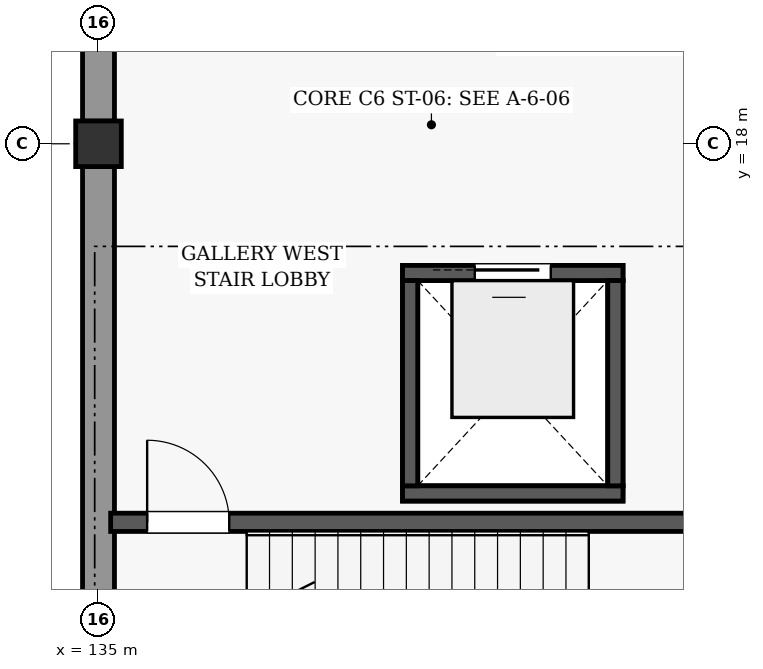
"""IFC4 building model, lengths in metres.
Left out: names, types, materials, properties, quantities, classifications, styles, units other than length and angle.
Written with IfcOpenShell. Run it as: python <this file> out.ifc"""

import sys

from ifc_helpers import new_model, si_unit, direction, frame, frame_2d, origin, origin_2d, place, context, subcontext, project, spatial, rectangle, extrude, element, fill, save


model = new_model("IFC4")
c1 = context("Model", 3, precision=1e-05, world=origin(), true_north=direction((0.0, 1.0)))
c2 = subcontext(c1, "Body", "Model", "MODEL_VIEW")
j1 = project(units=[si_unit("LENGTHUNIT", "METRE"), si_unit("PLANEANGLEUNIT", "RADIAN")], contexts=[c1])
p1 = place(None, origin())
s1 = spatial("IfcSite", under=j1, at=p1, CompositionType="ELEMENT")
p2 = place(p1, origin())
s2 = spatial("IfcBuilding", under=s1, at=p2, CompositionType="ELEMENT")
p3 = place(p2, origin())
s3 = spatial("IfcBuildingStorey", under=s2, at=p3, CompositionType="ELEMENT", Elevation=0.0)
p4 = place(p3, frame((135.0, 18.0, 0.0), z_axis=(0.0, 0.0, 1.0), x_axis=(1.0, 0.0, 0.0)))
e1 = element("IfcColumn", 1, at=p4, inside=s3, PredefinedType="COLUMN", context=c2, shape_type="SweptSolid", body=[
    extrude(rectangle(XDim=0.6, YDim=0.6, at=origin_2d()), origin(), (0.0, 0.0, 1.0), 4.8),
])
p5 = place(p3, frame((135.0, 9.348, 0.0), z_axis=(0.0, 0.0, 1.0), x_axis=(0.0, 1.0, 0.0)))
e2 = element("IfcWall", 2, at=p5, inside=s3, PredefinedType="SOLIDWALL", context=c2, shape_type="SweptSolid", body=[
    extrude(rectangle(XDim=8.354, YDim=0.42, at=frame_2d((4.177, 0.0))), origin(), (0.0, 0.0, 1.0), 4.062),
])
p6 = place(p5, frame((1.362, 0.0, 0.0)))
e3 = element("IfcOpeningElement", 3, at=p6, cuts=e2, PredefinedType="OPENING", context=c2, shape_type="SweptSolid", body=[
    extrude(rectangle(XDim=1.12, YDim=2.14, at=frame_2d((0.56, 1.07))), frame((0.0, 0.22, 0.0), z_axis=(0.0, -1.0, 0.0), x_axis=(1.0, 0.0, 0.0)), (0.0, 0.0, 1.0), 0.44),
])
p7 = place(p3, frame((135.0, 18.298, 0.0), z_axis=(0.0, 0.0, 1.0), x_axis=(0.0, 1.0, 0.0)))
e4 = element("IfcWall", 4, at=p7, inside=s3, PredefinedType="SOLIDWALL", context=c2, shape_type="SweptSolid", body=[
    extrude(rectangle(XDim=8.404, YDim=0.42, at=frame_2d((4.202, 0.0))), origin(), (0.0, 0.0, 1.0), 4.062),
])
p8 = place(p7, frame((1.815, 0.0, 0.85)))
e5 = element("IfcOpeningElement", 5, at=p8, cuts=e4, PredefinedType="OPENING", context=c2, shape_type="SweptSolid", body=[
    extrude(rectangle(XDim=1.48, YDim=1.56, at=frame_2d((0.74, 0.78))), frame((0.0, 0.22, 0.0), z_axis=(0.0, -1.0, 0.0), x_axis=(1.0, 0.0, 0.0)), (0.0, 0.0, 1.0), 0.44),
])
p9 = place(p7, frame((5.109, 0.0, 0.85)))
e6 = element("IfcOpeningElement", 6, at=p9, cuts=e4, PredefinedType="OPENING", context=c2, shape_type="SweptSolid", body=[
    extrude(rectangle(XDim=1.48, YDim=1.56, at=frame_2d((0.74, 0.78))), frame((0.0, 0.22, 0.0), z_axis=(0.0, -1.0, 0.0), x_axis=(1.0, 0.0, 0.0)), (0.0, 0.0, 1.0), 0.44),
])
p10 = place(p3, frame((135.16, 13.02, 0.0), z_axis=(0.0, 0.0, 1.0), x_axis=(1.0, 0.0, 0.0)))
e7 = element("IfcWall", 7, at=p10, inside=s3, PredefinedType="SHEAR", context=c2, shape_type="SweptSolid", body=[
    extrude(rectangle(XDim=8.44, YDim=0.24, at=frame_2d((4.22, 0.0))), origin(), (0.0, 0.0, 1.0), 4.55),
])
p11 = place(p10, frame((0.48, 0.0, 0.0)))
e8 = element("IfcOpeningElement", 8, at=p11, cuts=e7, PredefinedType="OPENING", context=c2, shape_type="SweptSolid", body=[
    extrude(rectangle(XDim=1.08, YDim=2.08, at=frame_2d((0.54, 1.04))), frame((0.0, 0.13, 0.0), z_axis=(0.0, -1.0, 0.0), x_axis=(1.0, 0.0, 0.0)), (0.0, 0.0, 1.0), 0.26),
])
for number, where, z_axis, x_axis in (
    (9, (139.0, 13.4, -1.4), (0.0, 0.0, 1.0), (1.0, 0.0, 0.0)),
    (10, (139.0, 16.3, -1.4), (0.0, 0.0, 1.0), (1.0, 0.0, 0.0)),
):
    element("IfcWall", number, at=place(p3, frame(where, z_axis=z_axis, x_axis=x_axis)), inside=s3, PredefinedType="SHEAR", context=c2, shape_type="SweptSolid", body=[
        extrude(rectangle(XDim=2.9, YDim=0.2, at=frame_2d((1.45, 0.0))), origin(), (0.0, 0.0, 1.0), 1.1),
    ])
for number, where, z_axis, x_axis in (
    (11, (139.1, 13.5, -1.4), (0.0, 0.0, 1.0), (0.0, 1.0, 0.0)),
    (12, (141.8, 13.5, -1.4), (0.0, 0.0, 1.0), (0.0, 1.0, 0.0)),
):
    element("IfcWall", number, at=place(p3, frame(where, z_axis=z_axis, x_axis=x_axis)), inside=s3, PredefinedType="SHEAR", context=c2, shape_type="SweptSolid", body=[
        extrude(rectangle(XDim=2.7, YDim=0.2, at=frame_2d((1.35, 0.0))), origin(), (0.0, 0.0, 1.0), 1.1),
    ])
p12 = place(p3, frame((139.0, 13.4, 0.0), z_axis=(0.0, 0.0, 1.0), x_axis=(1.0, 0.0, 0.0)))
e13 = element("IfcWall", 13, at=p12, inside=s3, PredefinedType="SHEAR", context=c2, shape_type="SweptSolid", body=[
    extrude(rectangle(XDim=2.9, YDim=0.2, at=frame_2d((1.45, 0.0))), origin(), (0.0, 0.0, 1.0), 4.55),
])
p13 = place(p3, frame((139.0, 16.3, 0.0), z_axis=(0.0, 0.0, 1.0), x_axis=(1.0, 0.0, 0.0)))
e14 = element("IfcWall", 14, at=p13, inside=s3, PredefinedType="SHEAR", context=c2, shape_type="SweptSolid", body=[
    extrude(rectangle(XDim=2.9, YDim=0.2, at=frame_2d((1.45, 0.0))), origin(), (0.0, 0.0, 1.0), 4.55),
])
p14 = place(p13, frame((0.95, 0.0, 0.0)))
e15 = element("IfcOpeningElement", 15, at=p14, cuts=e14, PredefinedType="OPENING", context=c2, shape_type="SweptSolid", body=[
    extrude(rectangle(XDim=1.0, YDim=2.1, at=frame_2d((0.5, 1.05))), frame((0.0, 0.11, 0.0), z_axis=(0.0, -1.0, 0.0), x_axis=(1.0, 0.0, 0.0)), (0.0, 0.0, 1.0), 0.22),
])
for number, where, z_axis, x_axis in (
    (16, (139.1, 13.5, 0.0), (0.0, 0.0, 1.0), (0.0, 1.0, 0.0)),
    (17, (141.8, 13.5, 0.0), (0.0, 0.0, 1.0), (0.0, 1.0, 0.0)),
):
    element("IfcWall", number, at=place(p3, frame(where, z_axis=z_axis, x_axis=x_axis)), inside=s3, PredefinedType="SHEAR", context=c2, shape_type="SweptSolid", body=[
        extrude(rectangle(XDim=2.7, YDim=0.2, at=frame_2d((1.35, 0.0))), origin(), (0.0, 0.0, 1.0), 4.55),
    ])
p15 = place(p11, origin())
e18 = element("IfcDoor", 18, at=p15, inside=s3, OperationType="SINGLE_SWING_LEFT", PredefinedType="DOOR", context=c2, shape_type="SweptSolid", body=[
    extrude(rectangle(XDim=1.08, YDim=2.08, at=frame_2d((0.54, 1.04))), frame((0.0, 0.025, 0.0), z_axis=(0.0, -1.0, 0.0), x_axis=(1.0, 0.0, 0.0)), (0.0, 0.0, 1.0), 0.05),
])
fill(e8, e18)
p16 = place(p14, origin())
e19 = element("IfcDoor", 19, at=p16, inside=s3, OperationType="SLIDING_TO_LEFT", PredefinedType="DOOR", context=c2, shape_type="SweptSolid", body=[
    extrude(rectangle(XDim=1.0, YDim=2.1, at=frame_2d((0.5, 1.05))), frame((0.0, 0.025, 0.0), z_axis=(0.0, -1.0, 0.0), x_axis=(1.0, 0.0, 0.0)), (0.0, 0.0, 1.0), 0.05),
])
fill(e15, e19)
save(model, sys.argv[1])
